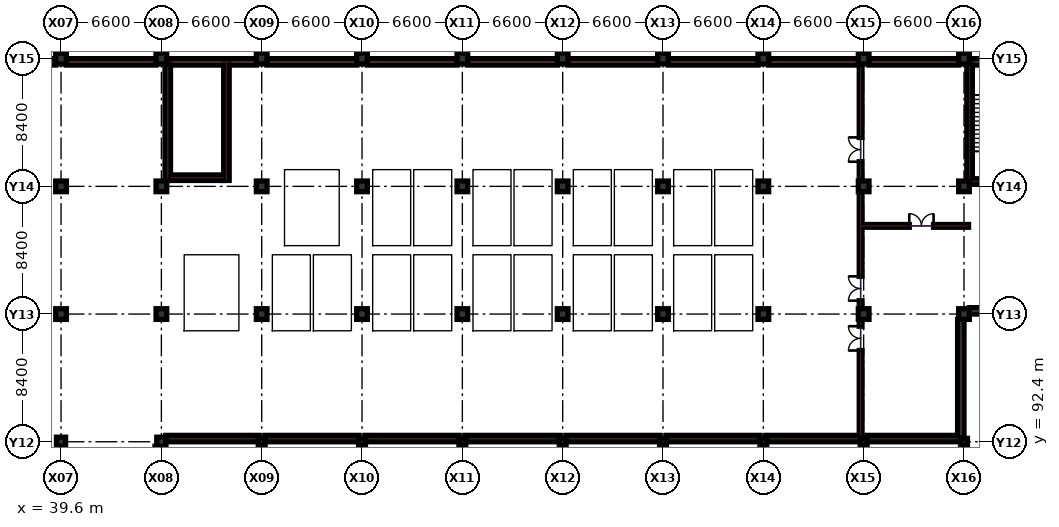
"""IFC4 building model, lengths in metres.
Left out: names, types, materials, properties, quantities, classifications, styles, units other than length and angle.
Written with IfcOpenShell. Run it as: python <this file> out.ifc"""

import sys

from ifc_helpers import new_model, si_unit, direction, frame, frame_2d, origin, origin_2d, place, context, subcontext, project, spatial, rectangle, extrude, element, fill, save


model = new_model("IFC4")
c1 = context("Model", 3, precision=1e-05, world=origin(), true_north=direction((0.0, 1.0)))
c2 = subcontext(c1, "Body", "Model", "MODEL_VIEW")
j1 = project(units=[si_unit("LENGTHUNIT", "METRE"), si_unit("PLANEANGLEUNIT", "RADIAN")], contexts=[c1])
p1 = place(None, origin())
s1 = spatial("IfcSite", under=j1, at=p1, CompositionType="ELEMENT")
p2 = place(p1, origin())
s2 = spatial("IfcBuilding", under=s1, at=p2, CompositionType="ELEMENT")
p3 = place(p2, frame((0.0, 0.0, -4.5)))
s3 = spatial("IfcBuildingStorey", under=s2, at=p3, CompositionType="ELEMENT", Elevation=-4.5)
p4 = place(p3, frame((39.6, 92.4, 0.0), z_axis=(0.0, 0.0, 1.0), x_axis=(1.0, 0.0, 0.0)))
e1 = element("IfcColumn", 1, at=p4, inside=s3, PredefinedType="COLUMN", context=c2, shape_type="SweptSolid", body=[
    extrude(rectangle(XDim=0.6, YDim=0.6, at=origin_2d()), origin(), (0.0, 0.0, 1.0), 4.5),
])
for number, where, z_axis, x_axis in (
    (2, (39.6, 100.8, 0.0), (0.0, 0.0, 1.0), (1.0, 0.0, 0.0)),
    (3, (39.6, 109.2, 0.0), (0.0, 0.0, 1.0), (1.0, 0.0, 0.0)),
    (4, (39.6, 117.6, 0.0), (0.0, 0.0, 1.0), (1.0, 0.0, 0.0)),
):
    element("IfcColumn", number, at=place(p3, frame(where, z_axis=z_axis, x_axis=x_axis)), inside=s3, PredefinedType="COLUMN", context=c2, shape_type="SweptSolid", body=[
        extrude(rectangle(XDim=0.7, YDim=0.7, at=origin_2d()), origin(), (0.0, 0.0, 1.0), 4.5),
    ])
p5 = place(p3, frame((46.2, 92.4, 0.0), z_axis=(0.0, 0.0, 1.0), x_axis=(1.0, 0.0, 0.0)))
e5 = element("IfcColumn", 5, at=p5, inside=s3, PredefinedType="COLUMN", context=c2, shape_type="SweptSolid", body=[
    extrude(rectangle(XDim=0.6, YDim=0.6, at=origin_2d()), origin(), (0.0, 0.0, 1.0), 4.5),
])
for number, where, z_axis, x_axis in (
    (6, (46.2, 100.8, 0.0), (0.0, 0.0, 1.0), (1.0, 0.0, 0.0)),
    (7, (46.2, 109.2, 0.0), (0.0, 0.0, 1.0), (1.0, 0.0, 0.0)),
    (8, (46.2, 117.6, 0.0), (0.0, 0.0, 1.0), (1.0, 0.0, 0.0)),
):
    element("IfcColumn", number, at=place(p3, frame(where, z_axis=z_axis, x_axis=x_axis)), inside=s3, PredefinedType="COLUMN", context=c2, shape_type="SweptSolid", body=[
        extrude(rectangle(XDim=0.7, YDim=0.7, at=origin_2d()), origin(), (0.0, 0.0, 1.0), 4.5),
    ])
p6 = place(p3, frame((52.8, 92.4, 0.0), z_axis=(0.0, 0.0, 1.0), x_axis=(1.0, 0.0, 0.0)))
e9 = element("IfcColumn", 9, at=p6, inside=s3, PredefinedType="COLUMN", context=c2, shape_type="SweptSolid", body=[
    extrude(rectangle(XDim=0.45, YDim=0.45, at=origin_2d()), origin(), (0.0, 0.0, 1.0), 4.5),
])
for number, where, z_axis, x_axis in (
    (10, (52.8, 100.8, 0.0), (0.0, 0.0, 1.0), (1.0, 0.0, 0.0)),
    (11, (52.8, 109.2, 0.0), (0.0, 0.0, 1.0), (1.0, 0.0, 0.0)),
    (12, (52.8, 117.6, 0.0), (0.0, 0.0, 1.0), (1.0, 0.0, 0.0)),
):
    element("IfcColumn", number, at=place(p3, frame(where, z_axis=z_axis, x_axis=x_axis)), inside=s3, PredefinedType="COLUMN", context=c2, shape_type="SweptSolid", body=[
        extrude(rectangle(XDim=0.7, YDim=0.7, at=origin_2d()), origin(), (0.0, 0.0, 1.0), 4.5),
    ])
p7 = place(p3, frame((59.4, 92.4, 0.0), z_axis=(0.0, 0.0, 1.0), x_axis=(1.0, 0.0, 0.0)))
e13 = element("IfcColumn", 13, at=p7, inside=s3, PredefinedType="COLUMN", context=c2, shape_type="SweptSolid", body=[
    extrude(rectangle(XDim=0.45, YDim=0.45, at=origin_2d()), origin(), (0.0, 0.0, 1.0), 4.5),
])
for number, where, z_axis, x_axis in (
    (14, (59.4, 100.8, 0.0), (0.0, 0.0, 1.0), (1.0, 0.0, 0.0)),
    (15, (59.4, 109.2, 0.0), (0.0, 0.0, 1.0), (1.0, 0.0, 0.0)),
    (16, (59.4, 117.6, 0.0), (0.0, 0.0, 1.0), (1.0, 0.0, 0.0)),
):
    element("IfcColumn", number, at=place(p3, frame(where, z_axis=z_axis, x_axis=x_axis)), inside=s3, PredefinedType="COLUMN", context=c2, shape_type="SweptSolid", body=[
        extrude(rectangle(XDim=0.7, YDim=0.7, at=origin_2d()), origin(), (0.0, 0.0, 1.0), 4.5),
    ])
p8 = place(p3, frame((66.0, 92.4, 0.0), z_axis=(0.0, 0.0, 1.0), x_axis=(1.0, 0.0, 0.0)))
e17 = element("IfcColumn", 17, at=p8, inside=s3, PredefinedType="COLUMN", context=c2, shape_type="SweptSolid", body=[
    extrude(rectangle(XDim=0.45, YDim=0.45, at=origin_2d()), origin(), (0.0, 0.0, 1.0), 4.5),
])
for number, where, z_axis, x_axis in (
    (18, (66.0, 100.8, 0.0), (0.0, 0.0, 1.0), (1.0, 0.0, 0.0)),
    (19, (66.0, 109.2, 0.0), (0.0, 0.0, 1.0), (1.0, 0.0, 0.0)),
    (20, (66.0, 117.6, 0.0), (0.0, 0.0, 1.0), (1.0, 0.0, 0.0)),
):
    element("IfcColumn", number, at=place(p3, frame(where, z_axis=z_axis, x_axis=x_axis)), inside=s3, PredefinedType="COLUMN", context=c2, shape_type="SweptSolid", body=[
        extrude(rectangle(XDim=0.7, YDim=0.7, at=origin_2d()), origin(), (0.0, 0.0, 1.0), 4.5),
    ])
p9 = place(p3, frame((72.6, 92.4, 0.0), z_axis=(0.0, 0.0, 1.0), x_axis=(1.0, 0.0, 0.0)))
e21 = element("IfcColumn", 21, at=p9, inside=s3, PredefinedType="COLUMN", context=c2, shape_type="SweptSolid", body=[
    extrude(rectangle(XDim=0.45, YDim=0.45, at=origin_2d()), origin(), (0.0, 0.0, 1.0), 4.5),
])
for number, where, z_axis, x_axis in (
    (22, (72.6, 100.8, 0.0), (0.0, 0.0, 1.0), (1.0, 0.0, 0.0)),
    (23, (72.6, 109.2, 0.0), (0.0, 0.0, 1.0), (1.0, 0.0, 0.0)),
    (24, (72.6, 117.6, 0.0), (0.0, 0.0, 1.0), (1.0, 0.0, 0.0)),
):
    element("IfcColumn", number, at=place(p3, frame(where, z_axis=z_axis, x_axis=x_axis)), inside=s3, PredefinedType="COLUMN", context=c2, shape_type="SweptSolid", body=[
        extrude(rectangle(XDim=0.7, YDim=0.7, at=origin_2d()), origin(), (0.0, 0.0, 1.0), 4.5),
    ])
p10 = place(p3, frame((79.2, 92.4, 0.0), z_axis=(0.0, 0.0, 1.0), x_axis=(1.0, 0.0, 0.0)))
e25 = element("IfcColumn", 25, at=p10, inside=s3, PredefinedType="COLUMN", context=c2, shape_type="SweptSolid", body=[
    extrude(rectangle(XDim=0.45, YDim=0.45, at=origin_2d()), origin(), (0.0, 0.0, 1.0), 4.5),
])
for number, where, z_axis, x_axis in (
    (26, (79.2, 100.8, 0.0), (0.0, 0.0, 1.0), (1.0, 0.0, 0.0)),
    (27, (79.2, 109.2, 0.0), (0.0, 0.0, 1.0), (1.0, 0.0, 0.0)),
    (28, (79.2, 117.6, 0.0), (0.0, 0.0, 1.0), (1.0, 0.0, 0.0)),
):
    element("IfcColumn", number, at=place(p3, frame(where, z_axis=z_axis, x_axis=x_axis)), inside=s3, PredefinedType="COLUMN", context=c2, shape_type="SweptSolid", body=[
        extrude(rectangle(XDim=0.7, YDim=0.7, at=origin_2d()), origin(), (0.0, 0.0, 1.0), 4.5),
    ])
p11 = place(p3, frame((85.8, 92.4, 0.0), z_axis=(0.0, 0.0, 1.0), x_axis=(1.0, 0.0, 0.0)))
e29 = element("IfcColumn", 29, at=p11, inside=s3, PredefinedType="COLUMN", context=c2, shape_type="SweptSolid", body=[
    extrude(rectangle(XDim=0.45, YDim=0.45, at=origin_2d()), origin(), (0.0, 0.0, 1.0), 4.5),
])
for number, where, z_axis, x_axis in (
    (30, (85.8, 100.8, 0.0), (0.0, 0.0, 1.0), (1.0, 0.0, 0.0)),
    (31, (85.8, 109.2, 0.0), (0.0, 0.0, 1.0), (1.0, 0.0, 0.0)),
    (32, (85.8, 117.6, 0.0), (0.0, 0.0, 1.0), (1.0, 0.0, 0.0)),
):
    element("IfcColumn", number, at=place(p3, frame(where, z_axis=z_axis, x_axis=x_axis)), inside=s3, PredefinedType="COLUMN", context=c2, shape_type="SweptSolid", body=[
        extrude(rectangle(XDim=0.7, YDim=0.7, at=origin_2d()), origin(), (0.0, 0.0, 1.0), 4.5),
    ])
p12 = place(p3, frame((92.4, 92.4, 0.0), z_axis=(0.0, 0.0, 1.0), x_axis=(1.0, 0.0, 0.0)))
e33 = element("IfcColumn", 33, at=p12, inside=s3, PredefinedType="COLUMN", context=c2, shape_type="SweptSolid", body=[
    extrude(rectangle(XDim=0.45, YDim=0.45, at=origin_2d()), origin(), (0.0, 0.0, 1.0), 4.5),
])
for number, where, z_axis, x_axis in (
    (34, (92.4, 100.8, 0.0), (0.0, 0.0, 1.0), (1.0, 0.0, 0.0)),
    (35, (92.4, 109.2, 0.0), (0.0, 0.0, 1.0), (1.0, 0.0, 0.0)),
    (36, (92.4, 117.6, 0.0), (0.0, 0.0, 1.0), (1.0, 0.0, 0.0)),
):
    element("IfcColumn", number, at=place(p3, frame(where, z_axis=z_axis, x_axis=x_axis)), inside=s3, PredefinedType="COLUMN", context=c2, shape_type="SweptSolid", body=[
        extrude(rectangle(XDim=0.7, YDim=0.7, at=origin_2d()), origin(), (0.0, 0.0, 1.0), 4.5),
    ])
p13 = place(p3, frame((99.0, 92.4, 0.0), z_axis=(0.0, 0.0, 1.0), x_axis=(1.0, 0.0, 0.0)))
e37 = element("IfcColumn", 37, at=p13, inside=s3, PredefinedType="COLUMN", context=c2, shape_type="SweptSolid", body=[
    extrude(rectangle(XDim=0.45, YDim=0.45, at=origin_2d()), origin(), (0.0, 0.0, 1.0), 4.5),
])
for number, where, z_axis, x_axis in (
    (38, (99.0, 100.8, 0.0), (0.0, 0.0, 1.0), (1.0, 0.0, 0.0)),
    (39, (99.0, 109.2, 0.0), (0.0, 0.0, 1.0), (1.0, 0.0, 0.0)),
    (40, (99.0, 117.6, 0.0), (0.0, 0.0, 1.0), (1.0, 0.0, 0.0)),
):
    element("IfcColumn", number, at=place(p3, frame(where, z_axis=z_axis, x_axis=x_axis)), inside=s3, PredefinedType="COLUMN", context=c2, shape_type="SweptSolid", body=[
        extrude(rectangle(XDim=0.7, YDim=0.7, at=origin_2d()), origin(), (0.0, 0.0, 1.0), 4.5),
    ])
p14 = place(p3, frame((92.2, 92.82, 0.0), z_axis=(0.0, 0.0, 1.0), x_axis=(0.0, 1.0, 0.0)))
e41 = element("IfcWall", 41, at=p14, inside=s3, PredefinedType="SOLIDWALL", context=c2, shape_type="SweptSolid", body=[
    extrude(rectangle(XDim=7.53, YDim=0.18, at=frame_2d((3.765, 0.0))), origin(), (0.0, 0.0, 1.0), 3.29),
])
p15 = place(p14, frame((5.58, 0.0, 0.0)))
e42 = element("IfcOpeningElement", 42, at=p15, cuts=e41, PredefinedType="OPENING", context=c2, shape_type="SweptSolid", body=[
    extrude(rectangle(XDim=1.6, YDim=2.2, at=frame_2d((0.8, 1.1))), frame((0.0, 0.1, 0.0), z_axis=(0.0, -1.0, 0.0), x_axis=(1.0, 0.0, 0.0)), (0.0, 0.0, 1.0), 0.2),
])
p16 = place(p3, frame((92.2, 101.25, 0.0), z_axis=(0.0, 0.0, 1.0), x_axis=(0.0, 1.0, 0.0)))
e43 = element("IfcWall", 43, at=p16, inside=s3, PredefinedType="SOLIDWALL", context=c2, shape_type="SweptSolid", body=[
    extrude(rectangle(XDim=7.5, YDim=0.18, at=frame_2d((3.75, 0.0))), origin(), (0.0, 0.0, 1.0), 3.29),
])
p17 = place(p16, frame((0.43, 0.0, 0.0)))
e44 = element("IfcOpeningElement", 44, at=p17, cuts=e43, PredefinedType="OPENING", context=c2, shape_type="SweptSolid", body=[
    extrude(rectangle(XDim=1.6, YDim=2.2, at=frame_2d((0.8, 1.1))), frame((0.0, 0.1, 0.0), z_axis=(0.0, -1.0, 0.0), x_axis=(1.0, 0.0, 0.0)), (0.0, 0.0, 1.0), 0.2),
])
p18 = place(p3, frame((92.2, 109.65, 0.0), z_axis=(0.0, 0.0, 1.0), x_axis=(0.0, 1.0, 0.0)))
e45 = element("IfcWall", 45, at=p18, inside=s3, PredefinedType="SOLIDWALL", context=c2, shape_type="SweptSolid", body=[
    extrude(rectangle(XDim=7.65, YDim=0.18, at=frame_2d((3.825, 0.0))), origin(), (0.0, 0.0, 1.0), 3.29),
])
p19 = place(p18, frame((1.17, 0.0, 0.0)))
e46 = element("IfcOpeningElement", 46, at=p19, cuts=e45, PredefinedType="OPENING", context=c2, shape_type="SweptSolid", body=[
    extrude(rectangle(XDim=1.6, YDim=2.2, at=frame_2d((0.8, 1.1))), frame((0.0, 0.1, 0.0), z_axis=(0.0, -1.0, 0.0), x_axis=(1.0, 0.0, 0.0)), (0.0, 0.0, 1.0), 0.2),
])
p20 = place(p3, frame((92.2, 106.6, 0.0), z_axis=(0.0, 0.0, 1.0), x_axis=(1.0, 0.0, 0.0)))
e47 = element("IfcWall", 47, at=p20, inside=s3, PredefinedType="SOLIDWALL", context=c2, shape_type="SweptSolid", body=[
    extrude(rectangle(XDim=7.1, YDim=0.18, at=frame_2d((3.55, 0.0))), origin(), (0.0, 0.0, 1.0), 3.29),
])
p21 = place(p20, frame((3.2, 0.0, 0.0)))
e48 = element("IfcOpeningElement", 48, at=p21, cuts=e47, PredefinedType="OPENING", context=c2, shape_type="SweptSolid", body=[
    extrude(rectangle(XDim=1.6, YDim=2.2, at=frame_2d((0.8, 1.1))), frame((0.0, 0.1, 0.0), z_axis=(0.0, -1.0, 0.0), x_axis=(1.0, 0.0, 0.0)), (0.0, 0.0, 1.0), 0.2),
])
p22 = place(p3, frame((39.255, 117.39, 0.0), z_axis=(0.0, 0.0, 1.0), x_axis=(-1.0, 0.0, 0.0)))
e49 = element("IfcWall", 49, at=p22, inside=s3, PredefinedType="SOLIDWALL", context=c2, shape_type="SweptSolid", body=[
    extrude(rectangle(XDim=5.96, YDim=0.42, at=frame_2d((2.98, 0.0))), origin(), (0.0, 0.0, 1.0), 4.14),
])
p23 = place(p3, frame((45.99, 84.295, 0.0), z_axis=(0.0, 0.0, 1.0), x_axis=(0.0, 1.0, 0.0)))
e50 = element("IfcWall", 50, at=p23, inside=s3, PredefinedType="SOLIDWALL", context=c2, shape_type="SweptSolid", body=[
    extrude(rectangle(XDim=7.81, YDim=0.42, at=frame_2d((3.905, 0.0))), origin(), (0.0, 0.0, 1.0), 4.14),
])
p24 = place(p3, frame((45.855, 117.39, 0.0), z_axis=(0.0, 0.0, 1.0), x_axis=(-1.0, 0.0, 0.0)))
e51 = element("IfcWall", 51, at=p24, inside=s3, PredefinedType="SOLIDWALL", context=c2, shape_type="SweptSolid", body=[
    extrude(rectangle(XDim=5.91, YDim=0.42, at=frame_2d((2.955, 0.0))), origin(), (0.0, 0.0, 1.0), 4.14),
])
p25 = place(p3, frame((46.495, 92.61, 0.0), z_axis=(0.0, 0.0, 1.0), x_axis=(1.0, 0.0, 0.0)))
e52 = element("IfcWall", 52, at=p25, inside=s3, PredefinedType="SOLIDWALL", context=c2, shape_type="SweptSolid", body=[
    extrude(rectangle(XDim=6.085, YDim=0.42, at=frame_2d((3.042, 0.0))), origin(), (0.0, 0.0, 1.0), 4.14),
])
p26 = place(p3, frame((52.455, 117.39, 0.0), z_axis=(0.0, 0.0, 1.0), x_axis=(-1.0, 0.0, 0.0)))
e53 = element("IfcWall", 53, at=p26, inside=s3, PredefinedType="SOLIDWALL", context=c2, shape_type="SweptSolid", body=[
    extrude(rectangle(XDim=5.91, YDim=0.42, at=frame_2d((2.955, 0.0))), origin(), (0.0, 0.0, 1.0), 4.14),
])
p27 = place(p3, frame((53.02, 92.61, 0.0), z_axis=(0.0, 0.0, 1.0), x_axis=(1.0, 0.0, 0.0)))
e54 = element("IfcWall", 54, at=p27, inside=s3, PredefinedType="SOLIDWALL", context=c2, shape_type="SweptSolid", body=[
    extrude(rectangle(XDim=6.16, YDim=0.42, at=frame_2d((3.08, 0.0))), origin(), (0.0, 0.0, 1.0), 4.14),
])
p28 = place(p3, frame((59.055, 117.39, 0.0), z_axis=(0.0, 0.0, 1.0), x_axis=(-1.0, 0.0, 0.0)))
e55 = element("IfcWall", 55, at=p28, inside=s3, PredefinedType="SOLIDWALL", context=c2, shape_type="SweptSolid", body=[
    extrude(rectangle(XDim=5.91, YDim=0.42, at=frame_2d((2.955, 0.0))), origin(), (0.0, 0.0, 1.0), 4.14),
])
p29 = place(p3, frame((59.62, 92.61, 0.0), z_axis=(0.0, 0.0, 1.0), x_axis=(1.0, 0.0, 0.0)))
e56 = element("IfcWall", 56, at=p29, inside=s3, PredefinedType="SOLIDWALL", context=c2, shape_type="SweptSolid", body=[
    extrude(rectangle(XDim=6.16, YDim=0.42, at=frame_2d((3.08, 0.0))), origin(), (0.0, 0.0, 1.0), 4.14),
])
p30 = place(p3, frame((65.655, 117.39, 0.0), z_axis=(0.0, 0.0, 1.0), x_axis=(-1.0, 0.0, 0.0)))
e57 = element("IfcWall", 57, at=p30, inside=s3, PredefinedType="SOLIDWALL", context=c2, shape_type="SweptSolid", body=[
    extrude(rectangle(XDim=5.91, YDim=0.42, at=frame_2d((2.955, 0.0))), origin(), (0.0, 0.0, 1.0), 4.14),
])
p31 = place(p3, frame((66.22, 92.61, 0.0), z_axis=(0.0, 0.0, 1.0), x_axis=(1.0, 0.0, 0.0)))
e58 = element("IfcWall", 58, at=p31, inside=s3, PredefinedType="SOLIDWALL", context=c2, shape_type="SweptSolid", body=[
    extrude(rectangle(XDim=6.16, YDim=0.42, at=frame_2d((3.08, 0.0))), origin(), (0.0, 0.0, 1.0), 4.14),
])
p32 = place(p3, frame((72.255, 117.39, 0.0), z_axis=(0.0, 0.0, 1.0), x_axis=(-1.0, 0.0, 0.0)))
e59 = element("IfcWall", 59, at=p32, inside=s3, PredefinedType="SOLIDWALL", context=c2, shape_type="SweptSolid", body=[
    extrude(rectangle(XDim=5.91, YDim=0.42, at=frame_2d((2.955, 0.0))), origin(), (0.0, 0.0, 1.0), 4.14),
])
p33 = place(p3, frame((72.82, 92.61, 0.0), z_axis=(0.0, 0.0, 1.0), x_axis=(1.0, 0.0, 0.0)))
e60 = element("IfcWall", 60, at=p33, inside=s3, PredefinedType="SOLIDWALL", context=c2, shape_type="SweptSolid", body=[
    extrude(rectangle(XDim=6.16, YDim=0.42, at=frame_2d((3.08, 0.0))), origin(), (0.0, 0.0, 1.0), 4.14),
])
p34 = place(p3, frame((78.855, 117.39, 0.0), z_axis=(0.0, 0.0, 1.0), x_axis=(-1.0, 0.0, 0.0)))
e61 = element("IfcWall", 61, at=p34, inside=s3, PredefinedType="SOLIDWALL", context=c2, shape_type="SweptSolid", body=[
    extrude(rectangle(XDim=5.91, YDim=0.42, at=frame_2d((2.955, 0.0))), origin(), (0.0, 0.0, 1.0), 4.14),
])
p35 = place(p3, frame((79.42, 92.61, 0.0), z_axis=(0.0, 0.0, 1.0), x_axis=(1.0, 0.0, 0.0)))
e62 = element("IfcWall", 62, at=p35, inside=s3, PredefinedType="SOLIDWALL", context=c2, shape_type="SweptSolid", body=[
    extrude(rectangle(XDim=6.16, YDim=0.42, at=frame_2d((3.08, 0.0))), origin(), (0.0, 0.0, 1.0), 4.14),
])
p36 = place(p3, frame((85.455, 117.39, 0.0), z_axis=(0.0, 0.0, 1.0), x_axis=(-1.0, 0.0, 0.0)))
e63 = element("IfcWall", 63, at=p36, inside=s3, PredefinedType="SOLIDWALL", context=c2, shape_type="SweptSolid", body=[
    extrude(rectangle(XDim=5.91, YDim=0.42, at=frame_2d((2.955, 0.0))), origin(), (0.0, 0.0, 1.0), 4.14),
])
p37 = place(p3, frame((86.02, 92.61, 0.0), z_axis=(0.0, 0.0, 1.0), x_axis=(1.0, 0.0, 0.0)))
e64 = element("IfcWall", 64, at=p37, inside=s3, PredefinedType="SOLIDWALL", context=c2, shape_type="SweptSolid", body=[
    extrude(rectangle(XDim=6.16, YDim=0.42, at=frame_2d((3.08, 0.0))), origin(), (0.0, 0.0, 1.0), 4.14),
])
p38 = place(p3, frame((92.055, 117.39, 0.0), z_axis=(0.0, 0.0, 1.0), x_axis=(-1.0, 0.0, 0.0)))
e65 = element("IfcWall", 65, at=p38, inside=s3, PredefinedType="SOLIDWALL", context=c2, shape_type="SweptSolid", body=[
    extrude(rectangle(XDim=5.91, YDim=0.42, at=frame_2d((2.955, 0.0))), origin(), (0.0, 0.0, 1.0), 4.14),
])
p39 = place(p3, frame((92.62, 92.61, 0.0), z_axis=(0.0, 0.0, 1.0), x_axis=(1.0, 0.0, 0.0)))
e66 = element("IfcWall", 66, at=p39, inside=s3, PredefinedType="SOLIDWALL", context=c2, shape_type="SweptSolid", body=[
    extrude(rectangle(XDim=6.16, YDim=0.42, at=frame_2d((3.08, 0.0))), origin(), (0.0, 0.0, 1.0), 4.14),
])
p40 = place(p3, frame((98.79, 92.62, 0.0), z_axis=(0.0, 0.0, 1.0), x_axis=(0.0, 1.0, 0.0)))
e67 = element("IfcWall", 67, at=p40, inside=s3, PredefinedType="SOLIDWALL", context=c2, shape_type="SweptSolid", body=[
    extrude(rectangle(XDim=7.835, YDim=0.42, at=frame_2d((3.917, 0.0))), origin(), (0.0, 0.0, 1.0), 4.14),
])
for number, where, z_axis, x_axis in (
    (68, (98.655, 117.39, 0.0), (0.0, 0.0, 1.0), (-1.0, 0.0, 0.0)),
    (69, (99.345, 101.01, 0.0), (0.0, 0.0, 1.0), (1.0, 0.0, 0.0)),
):
    element("IfcWall", number, at=place(p3, frame(where, z_axis=z_axis, x_axis=x_axis)), inside=s3, PredefinedType="SOLIDWALL", context=c2, shape_type="SweptSolid", body=[
        extrude(rectangle(XDim=5.91, YDim=0.42, at=frame_2d((2.955, 0.0))), origin(), (0.0, 0.0, 1.0), 4.14),
    ])
p41 = place(p3, frame((105.25, 117.39, 0.0), z_axis=(0.0, 0.0, 1.0), x_axis=(-1.0, 0.0, 0.0)))
e70 = element("IfcWall", 70, at=p41, inside=s3, PredefinedType="SOLIDWALL", context=c2, shape_type="SweptSolid", body=[
    extrude(rectangle(XDim=5.9, YDim=0.42, at=frame_2d((2.95, 0.0))), origin(), (0.0, 0.0, 1.0), 4.14),
])
p42 = place(p3, frame((99.37, 109.34, 0.0), z_axis=(0.0, 0.0, 1.0), x_axis=(0.0, 1.0, 0.0)))
e71 = element("IfcWall", 71, at=p42, inside=s3, PredefinedType="SHEAR", context=c2, shape_type="SweptSolid", body=[
    extrude(rectangle(XDim=8.05, YDim=0.36, at=frame_2d((4.025, 0.0))), origin(), (0.0, 0.0, 1.0), 4.14),
])
p43 = place(p3, frame((99.55, 109.52, 0.0), z_axis=(0.0, 0.0, 1.0), x_axis=(1.0, 0.0, 0.0)))
e72 = element("IfcWall", 72, at=p43, inside=s3, PredefinedType="SHEAR", context=c2, shape_type="SweptSolid", body=[
    extrude(rectangle(XDim=3.8, YDim=0.36, at=frame_2d((1.9, 0.0))), origin(), (0.0, 0.0, 1.0), 4.14),
])
for number, where, z_axis, x_axis in (
    (73, (46.62, 109.59, 0.0), (0.0, 0.0, 1.0), (0.0, 1.0, 0.0)),
    (74, (50.48, 109.59, 0.0), (0.0, 0.0, 1.0), (0.0, 1.0, 0.0)),
):
    element("IfcWall", number, at=place(p3, frame(where, z_axis=z_axis, x_axis=x_axis)), inside=s3, PredefinedType="SHEAR", context=c2, shape_type="SweptSolid", body=[
        extrude(rectangle(XDim=7.8, YDim=0.36, at=frame_2d((3.9, 0.0))), origin(), (0.0, 0.0, 1.0), 4.14),
    ])
p44 = place(p3, frame((46.8, 109.77, 0.0), z_axis=(0.0, 0.0, 1.0), x_axis=(1.0, 0.0, 0.0)))
e75 = element("IfcWall", 75, at=p44, inside=s3, PredefinedType="SHEAR", context=c2, shape_type="SweptSolid", body=[
    extrude(rectangle(XDim=3.5, YDim=0.36, at=frame_2d((1.75, 0.0))), origin(), (0.0, 0.0, 1.0), 4.14),
])
p45 = place(p15, origin())
e76 = element("IfcDoor", 76, at=p45, inside=s3, OperationType="DOUBLE_DOOR_SINGLE_SWING", PredefinedType="DOOR", context=c2, shape_type="SweptSolid", body=[
    extrude(rectangle(XDim=1.6, YDim=2.2, at=frame_2d((0.8, 1.1))), frame((0.0, 0.025, 0.0), z_axis=(0.0, -1.0, 0.0), x_axis=(1.0, 0.0, 0.0)), (0.0, 0.0, 1.0), 0.05),
])
fill(e42, e76)
p46 = place(p17, origin())
e77 = element("IfcDoor", 77, at=p46, inside=s3, OperationType="DOUBLE_DOOR_SINGLE_SWING", PredefinedType="DOOR", context=c2, shape_type="SweptSolid", body=[
    extrude(rectangle(XDim=1.6, YDim=2.2, at=frame_2d((0.8, 1.1))), frame((0.0, 0.025, 0.0), z_axis=(0.0, -1.0, 0.0), x_axis=(1.0, 0.0, 0.0)), (0.0, 0.0, 1.0), 0.05),
])
fill(e44, e77)
p47 = place(p19, origin())
e78 = element("IfcDoor", 78, at=p47, inside=s3, OperationType="DOUBLE_DOOR_SINGLE_SWING", PredefinedType="DOOR", context=c2, shape_type="SweptSolid", body=[
    extrude(rectangle(XDim=1.6, YDim=2.2, at=frame_2d((0.8, 1.1))), frame((0.0, 0.025, 0.0), z_axis=(0.0, -1.0, 0.0), x_axis=(1.0, 0.0, 0.0)), (0.0, 0.0, 1.0), 0.05),
])
fill(e46, e78)
p48 = place(p21, origin())
e79 = element("IfcDoor", 79, at=p48, inside=s3, OperationType="DOUBLE_DOOR_SINGLE_SWING", PredefinedType="DOOR", context=c2, shape_type="SweptSolid", body=[
    extrude(rectangle(XDim=1.6, YDim=2.2, at=frame_2d((0.8, 1.1))), frame((0.0, 0.025, 0.0), z_axis=(0.0, -1.0, 0.0), x_axis=(1.0, 0.0, 0.0)), (0.0, 0.0, 1.0), 0.05),
])
fill(e48, e79)
save(model, sys.argv[1])
